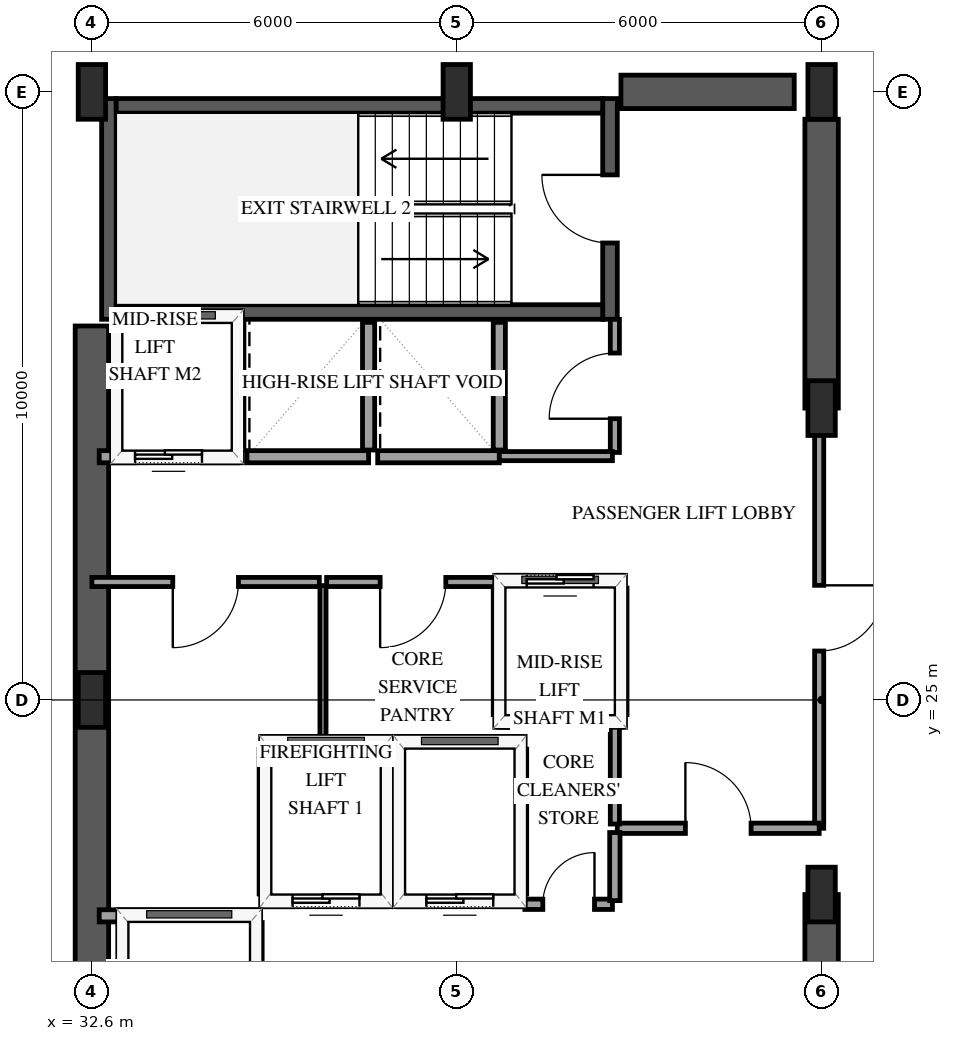
"""IFC4 building model, lengths in metres.
Left out: names, types, materials, properties, quantities, classifications, styles, units other than length and angle.
Written with IfcOpenShell. Run it as: python <this file> out.ifc"""

import sys

from ifc_helpers import new_model, si_unit, direction, frame, frame_2d, origin, origin_2d, place, context, subcontext, project, spatial, rectangle, extrude, element, fill, save


model = new_model("IFC4")
c1 = context("Model", 3, precision=1e-05, world=origin(), true_north=direction((0.0, 1.0)))
c2 = subcontext(c1, "Body", "Model", "MODEL_VIEW")
j1 = project(units=[si_unit("LENGTHUNIT", "METRE"), si_unit("PLANEANGLEUNIT", "RADIAN")], contexts=[c1])
p1 = place(None, origin())
s1 = spatial("IfcSite", under=j1, at=p1, CompositionType="ELEMENT")
p2 = place(p1, origin())
s2 = spatial("IfcBuilding", under=s1, at=p2, CompositionType="ELEMENT")
p3 = place(p2, frame((0.0, 0.0, 153.4)))
s3 = spatial("IfcBuildingStorey", under=s2, at=p3, CompositionType="ELEMENT", Elevation=153.4)
p4 = place(p3, frame((32.88, 31.26, 0.0), z_axis=(0.0, 0.0, 1.0), x_axis=(0.0, 1.0, 0.0)))
e1 = element("IfcWall", 1, at=p4, inside=s3, PredefinedType="SHEAR", context=c2, shape_type="SweptSolid", body=[
    extrude(rectangle(XDim=3.63, YDim=0.24, at=frame_2d((1.815, 0.0))), origin(), (0.0, 0.0, 1.0), 3.6),
])
p5 = place(p3, frame((41.12, 31.26, 0.0), z_axis=(0.0, 0.0, 1.0), x_axis=(0.0, 1.0, 0.0)))
e2 = element("IfcWall", 2, at=p5, inside=s3, PredefinedType="SHEAR", context=c2, shape_type="SweptSolid", body=[
    extrude(rectangle(XDim=3.63, YDim=0.24, at=frame_2d((1.815, 0.0))), origin(), (0.0, 0.0, 1.0), 3.6),
])
p6 = place(p5, frame((1.255, 0.0, 0.0)))
e3 = element("IfcOpeningElement", 3, at=p6, cuts=e2, PredefinedType="OPENING", context=c2, shape_type="SweptSolid", body=[
    extrude(rectangle(XDim=1.12, YDim=2.15, at=frame_2d((0.56, 1.075))), frame((0.0, 0.13, 0.0), z_axis=(0.0, -1.0, 0.0), x_axis=(1.0, 0.0, 0.0)), (0.0, 0.0, 1.0), 0.26),
])
for number, where, z_axis, x_axis in (
    (4, (33.0, 31.38, 0.0), (0.0, 0.0, 1.0), (1.0, 0.0, 0.0)),
    (5, (33.0, 34.77, 0.0), (0.0, 0.0, 1.0), (1.0, 0.0, 0.0)),
):
    element("IfcWall", number, at=place(p3, frame(where, z_axis=z_axis, x_axis=x_axis)), inside=s3, PredefinedType="SHEAR", context=c2, shape_type="SweptSolid", body=[
        extrude(rectangle(XDim=8.0, YDim=0.24, at=frame_2d((4.0, 0.0))), origin(), (0.0, 0.0, 1.0), 3.6),
    ])
p7 = place(p3, frame((32.6, 18.85, 0.0), z_axis=(0.0, 0.0, 1.0), x_axis=(0.0, 1.0, 0.0)))
e6 = element("IfcWall", 6, at=p7, inside=s3, PredefinedType="SHEAR", context=c2, shape_type="SweptSolid", body=[
    extrude(rectangle(XDim=12.3, YDim=0.55, at=frame_2d((6.15, 0.0))), origin(), (0.0, 0.0, 1.0), 3.6),
])
p8 = place(p3, frame((41.3, 35.0, 0.0), z_axis=(0.0, 0.0, 1.0), x_axis=(1.0, 0.0, 0.0)))
e7 = element("IfcWall", 7, at=p8, inside=s3, PredefinedType="SHEAR", context=c2, shape_type="SweptSolid", body=[
    extrude(rectangle(XDim=2.85, YDim=0.55, at=frame_2d((1.425, 0.0))), origin(), (0.0, 0.0, 1.0), 3.6),
])
p9 = place(p3, frame((44.6, 15.45, 0.0), z_axis=(0.0, 0.0, 1.0), x_axis=(0.0, 1.0, 0.0)))
e8 = element("IfcWall", 8, at=p9, inside=s3, PredefinedType="SHEAR", context=c2, shape_type="SweptSolid", body=[
    extrude(rectangle(XDim=6.35, YDim=0.55, at=frame_2d((3.175, 0.0))), origin(), (0.0, 0.0, 1.0), 3.6),
])
p10 = place(p3, frame((44.6, 29.8, 0.0), z_axis=(0.0, 0.0, 1.0), x_axis=(0.0, 1.0, 0.0)))
e9 = element("IfcWall", 9, at=p10, inside=s3, PredefinedType="SHEAR", context=c2, shape_type="SweptSolid", body=[
    extrude(rectangle(XDim=4.75, YDim=0.55, at=frame_2d((2.375, 0.0))), origin(), (0.0, 0.0, 1.0), 3.6),
])
for number, where, z_axis, x_axis in (
    (10, (32.6, 25.0, 0.0), (0.0, 0.0, 1.0), (1.0, 0.0, 0.0)),
    (11, (32.6, 35.0, 0.0), (0.0, 0.0, 1.0), (1.0, 0.0, 0.0)),
    (12, (38.6, 35.0, 0.0), (0.0, 0.0, 1.0), (1.0, 0.0, 0.0)),
    (13, (44.6, 21.8, 0.0), (0.0, 0.0, 1.0), (1.0, 0.0, 0.0)),
    (14, (44.6, 29.8, 0.0), (0.0, 0.0, 1.0), (1.0, 0.0, 0.0)),
    (15, (44.6, 35.0, 0.0), (0.0, 0.0, 1.0), (1.0, 0.0, 0.0)),
):
    element("IfcColumn", number, at=place(p3, frame(where, z_axis=z_axis, x_axis=x_axis)), inside=s3, PredefinedType="PILASTER", context=c2, shape_type="SweptSolid", body=[
        extrude(rectangle(XDim=0.45, YDim=0.9, at=origin_2d()), origin(), (0.0, 0.0, 1.0), 3.6),
    ])
p11 = place(p3, frame((32.04, 37.894, 0.0), z_axis=(0.0, 0.0, 1.0), x_axis=(-0.645495712839, -0.763763893299, 0.0)))
e16 = element("IfcWall", 16, at=p11, inside=s3, PredefinedType="SOLIDWALL", context=c2, shape_type="SweptSolid", body=[
    extrude(rectangle(XDim=2.966, YDim=0.27, at=frame_2d((1.483, 0.0))), origin(), (0.0, 0.0, 1.0), 2.679),
])
p12 = place(p3, frame((35.45, 21.7, 0.0), z_axis=(0.0, 0.0, 1.0), x_axis=(1.0, 0.0, 0.0)))
e17 = element("IfcWall", 17, at=p12, inside=s3, PredefinedType="SOLIDWALL", context=c2, shape_type="SweptSolid", body=[
    extrude(rectangle(XDim=2.0, YDim=0.2, at=frame_2d((1.0, 0.0))), origin(), (0.0, 0.0, 1.0), 3.3),
])
p13 = place(p12, frame((0.45, 0.0, 0.0)))
e18 = element("IfcOpeningElement", 18, at=p13, cuts=e17, PredefinedType="OPENING", context=c2, shape_type="SweptSolid", body=[
    extrude(rectangle(XDim=1.1, YDim=2.15, at=frame_2d((0.55, 1.075))), frame((0.0, 0.11, 0.0), z_axis=(0.0, -1.0, 0.0), x_axis=(1.0, 0.0, 0.0)), (0.0, 0.0, 1.0), 0.22),
])
p14 = place(p3, frame((35.45, 24.3, 0.0), z_axis=(0.0, 0.0, 1.0), x_axis=(1.0, 0.0, 0.0)))
e19 = element("IfcWall", 19, at=p14, inside=s3, PredefinedType="SOLIDWALL", context=c2, shape_type="SweptSolid", body=[
    extrude(rectangle(XDim=2.0, YDim=0.2, at=frame_2d((1.0, 0.0))), origin(), (0.0, 0.0, 1.0), 3.3),
])
for number, where, z_axis, x_axis in (
    (20, (35.45, 21.81, 0.0), (0.0, 0.0, 1.0), (0.0, 1.0, 0.0)),
    (21, (37.45, 21.81, 0.0), (0.0, 0.0, 1.0), (0.0, 1.0, 0.0)),
):
    element("IfcWall", number, at=place(p3, frame(where, z_axis=z_axis, x_axis=x_axis)), inside=s3, PredefinedType="SOLIDWALL", context=c2, shape_type="SweptSolid", body=[
        extrude(rectangle(XDim=2.38, YDim=0.2, at=frame_2d((1.19, 0.0))), origin(), (0.0, 0.0, 1.0), 3.3),
    ])
p15 = place(p3, frame((37.65, 21.7, 0.0), z_axis=(0.0, 0.0, 1.0), x_axis=(1.0, 0.0, 0.0)))
e22 = element("IfcWall", 22, at=p15, inside=s3, PredefinedType="SOLIDWALL", context=c2, shape_type="SweptSolid", body=[
    extrude(rectangle(XDim=2.0, YDim=0.2, at=frame_2d((1.0, 0.0))), origin(), (0.0, 0.0, 1.0), 3.3),
])
p16 = place(p15, frame((0.45, 0.0, 0.0)))
e23 = element("IfcOpeningElement", 23, at=p16, cuts=e22, PredefinedType="OPENING", context=c2, shape_type="SweptSolid", body=[
    extrude(rectangle(XDim=1.1, YDim=2.15, at=frame_2d((0.55, 1.075))), frame((0.0, 0.11, 0.0), z_axis=(0.0, -1.0, 0.0), x_axis=(1.0, 0.0, 0.0)), (0.0, 0.0, 1.0), 0.22),
])
p17 = place(p3, frame((37.65, 24.3, 0.0), z_axis=(0.0, 0.0, 1.0), x_axis=(1.0, 0.0, 0.0)))
e24 = element("IfcWall", 24, at=p17, inside=s3, PredefinedType="SOLIDWALL", context=c2, shape_type="SweptSolid", body=[
    extrude(rectangle(XDim=2.0, YDim=0.2, at=frame_2d((1.0, 0.0))), origin(), (0.0, 0.0, 1.0), 3.3),
])
p18 = place(p3, frame((39.65, 21.81, 0.0), z_axis=(0.0, 0.0, 1.0), x_axis=(0.0, 1.0, 0.0)))
e25 = element("IfcWall", 25, at=p18, inside=s3, PredefinedType="SOLIDWALL", context=c2, shape_type="SweptSolid", body=[
    extrude(rectangle(XDim=2.38, YDim=0.2, at=frame_2d((1.19, 0.0))), origin(), (0.0, 0.0, 1.0), 3.3),
])
p19 = place(p3, frame((32.72, 21.45, 0.0), z_axis=(0.0, 0.0, 1.0), x_axis=(1.0, 0.0, 0.0)))
e26 = element("IfcWall", 26, at=p19, inside=s3, PredefinedType="SOLIDWALL", context=c2, shape_type="SweptSolid", body=[
    extrude(rectangle(XDim=2.58, YDim=0.2, at=frame_2d((1.29, 0.0))), origin(), (0.0, 0.0, 1.0), 3.3),
])
p20 = place(p3, frame((35.3, 18.79, 0.0), z_axis=(0.0, 0.0, 1.0), x_axis=(0.0, 1.0, 0.0)))
e27 = element("IfcWall", 27, at=p20, inside=s3, PredefinedType="SOLIDWALL", context=c2, shape_type="SweptSolid", body=[
    extrude(rectangle(XDim=2.55, YDim=0.2, at=frame_2d((1.275, 0.0))), origin(), (0.0, 0.0, 1.0), 3.3),
])
p21 = place(p20, frame((0.725, 0.0, 0.0)))
e28 = element("IfcOpeningElement", 28, at=p21, cuts=e27, PredefinedType="OPENING", context=c2, shape_type="SweptSolid", body=[
    extrude(rectangle(XDim=1.1, YDim=2.15, at=frame_2d((0.55, 1.075))), frame((0.0, 0.11, 0.0), z_axis=(0.0, -1.0, 0.0), x_axis=(1.0, 0.0, 0.0)), (0.0, 0.0, 1.0), 0.22),
])
p22 = place(p3, frame((39.3, 24.65, 0.0), z_axis=(0.0, 0.0, 1.0), x_axis=(1.0, 0.0, 0.0)))
e29 = element("IfcWall", 29, at=p22, inside=s3, PredefinedType="SOLIDWALL", context=c2, shape_type="SweptSolid", body=[
    extrude(rectangle(XDim=2.0, YDim=0.2, at=frame_2d((1.0, 0.0))), origin(), (0.0, 0.0, 1.0), 3.3),
])
p23 = place(p3, frame((39.3, 26.95, 0.0), z_axis=(0.0, 0.0, 1.0), x_axis=(1.0, 0.0, 0.0)))
e30 = element("IfcWall", 30, at=p23, inside=s3, PredefinedType="SOLIDWALL", context=c2, shape_type="SweptSolid", body=[
    extrude(rectangle(XDim=2.0, YDim=0.2, at=frame_2d((1.0, 0.0))), origin(), (0.0, 0.0, 1.0), 3.3),
])
p24 = place(p23, frame((0.45, 0.0, 0.0)))
e31 = element("IfcOpeningElement", 31, at=p24, cuts=e30, PredefinedType="OPENING", context=c2, shape_type="SweptSolid", body=[
    extrude(rectangle(XDim=1.1, YDim=2.15, at=frame_2d((0.55, 1.075))), frame((0.0, 0.11, 0.0), z_axis=(0.0, -1.0, 0.0), x_axis=(1.0, 0.0, 0.0)), (0.0, 0.0, 1.0), 0.22),
])
for number, where, z_axis, x_axis in (
    (32, (39.3, 24.76, 0.0), (0.0, 0.0, 1.0), (0.0, 1.0, 0.0)),
    (33, (41.3, 24.76, 0.0), (0.0, 0.0, 1.0), (0.0, 1.0, 0.0)),
):
    element("IfcWall", number, at=place(p3, frame(where, z_axis=z_axis, x_axis=x_axis)), inside=s3, PredefinedType="SOLIDWALL", context=c2, shape_type="SweptSolid", body=[
        extrude(rectangle(XDim=2.08, YDim=0.2, at=frame_2d((1.04, 0.0))), origin(), (0.0, 0.0, 1.0), 3.3),
    ])
p25 = place(p3, frame((32.72, 29.0, 0.0), z_axis=(0.0, 0.0, 1.0), x_axis=(1.0, 0.0, 0.0)))
e34 = element("IfcWall", 34, at=p25, inside=s3, PredefinedType="SOLIDWALL", context=c2, shape_type="SweptSolid", body=[
    extrude(rectangle(XDim=2.28, YDim=0.2, at=frame_2d((1.14, 0.0))), origin(), (0.0, 0.0, 1.0), 3.3),
])
p26 = place(p25, frame((0.59, 0.0, 0.0)))
e35 = element("IfcOpeningElement", 35, at=p26, cuts=e34, PredefinedType="OPENING", context=c2, shape_type="SweptSolid", body=[
    extrude(rectangle(XDim=1.1, YDim=2.15, at=frame_2d((0.55, 1.075))), frame((0.0, 0.11, 0.0), z_axis=(0.0, -1.0, 0.0), x_axis=(1.0, 0.0, 0.0)), (0.0, 0.0, 1.0), 0.22),
])
p27 = place(p3, frame((35.0, 29.11, 0.0), z_axis=(0.0, 0.0, 1.0), x_axis=(0.0, 1.0, 0.0)))
e36 = element("IfcWall", 36, at=p27, inside=s3, PredefinedType="SOLIDWALL", context=c2, shape_type="SweptSolid", body=[
    extrude(rectangle(XDim=2.1, YDim=0.2, at=frame_2d((1.05, 0.0))), origin(), (0.0, 0.0, 1.0), 3.3),
])
p28 = place(p3, frame((35.15, 29.0, 0.0), z_axis=(0.0, 0.0, 1.0), x_axis=(1.0, 0.0, 0.0)))
e37 = element("IfcWall", 37, at=p28, inside=s3, PredefinedType="SOLIDWALL", context=c2, shape_type="SweptSolid", body=[
    extrude(rectangle(XDim=2.0, YDim=0.2, at=frame_2d((1.0, 0.0))), origin(), (0.0, 0.0, 1.0), 3.3),
])
p29 = place(p3, frame((37.15, 29.11, 0.0), z_axis=(0.0, 0.0, 1.0), x_axis=(0.0, 1.0, 0.0)))
e38 = element("IfcWall", 38, at=p29, inside=s3, PredefinedType="SOLIDWALL", context=c2, shape_type="SweptSolid", body=[
    extrude(rectangle(XDim=2.1, YDim=0.2, at=frame_2d((1.05, 0.0))), origin(), (0.0, 0.0, 1.0), 3.3),
])
p30 = place(p3, frame((37.3, 29.0, 0.0), z_axis=(0.0, 0.0, 1.0), x_axis=(1.0, 0.0, 0.0)))
e39 = element("IfcWall", 39, at=p30, inside=s3, PredefinedType="SOLIDWALL", context=c2, shape_type="SweptSolid", body=[
    extrude(rectangle(XDim=2.0, YDim=0.2, at=frame_2d((1.0, 0.0))), origin(), (0.0, 0.0, 1.0), 3.3),
])
p31 = place(p3, frame((39.3, 29.11, 0.0), z_axis=(0.0, 0.0, 1.0), x_axis=(0.0, 1.0, 0.0)))
e40 = element("IfcWall", 40, at=p31, inside=s3, PredefinedType="SOLIDWALL", context=c2, shape_type="SweptSolid", body=[
    extrude(rectangle(XDim=2.1, YDim=0.2, at=frame_2d((1.05, 0.0))), origin(), (0.0, 0.0, 1.0), 3.3),
])
p32 = place(p3, frame((44.56, 29.8, 0.0), z_axis=(0.0, 0.0, 1.0), x_axis=(0.0, -1.0, 0.0)))
e41 = element("IfcWall", 41, at=p32, inside=s3, PredefinedType="PARTITIONING", context=c2, shape_type="SweptSolid", body=[
    extrude(rectangle(XDim=6.91, YDim=0.15, at=frame_2d((3.455, 0.0))), origin(), (0.0, 0.0, 1.0), 2.34),
])
p33 = place(p32, frame((2.915, 0.0, 0.0)))
e42 = element("IfcOpeningElement", 42, at=p33, cuts=e41, PredefinedType="OPENING", context=c2, shape_type="SweptSolid", body=[
    extrude(rectangle(XDim=1.08, YDim=2.15, at=frame_2d((0.54, 1.075))), frame((0.0, 0.085, 0.0), z_axis=(0.0, -1.0, 0.0), x_axis=(1.0, 0.0, 0.0)), (0.0, 0.0, 1.0), 0.17),
])
p34 = place(p3, frame((36.34, 26.94, 0.0), z_axis=(0.0, 0.0, 1.0), x_axis=(-1.0, 0.0, 0.0)))
e43 = element("IfcWall", 43, at=p34, inside=s3, PredefinedType="PARTITIONING", context=c2, shape_type="SweptSolid", body=[
    extrude(rectangle(XDim=3.74, YDim=0.15, at=frame_2d((1.87, 0.0))), origin(), (0.0, 0.0, 1.0), 3.3),
])
p35 = place(p34, frame((1.33, 0.0, 0.0)))
e44 = element("IfcOpeningElement", 44, at=p35, cuts=e43, PredefinedType="OPENING", context=c2, shape_type="SweptSolid", body=[
    extrude(rectangle(XDim=1.08, YDim=2.15, at=frame_2d((0.54, 1.075))), frame((0.0, 0.085, 0.0), z_axis=(0.0, -1.0, 0.0), x_axis=(1.0, 0.0, 0.0)), (0.0, 0.0, 1.0), 0.17),
])
p36 = place(p3, frame((41.24, 22.89, 0.0), z_axis=(0.0, 0.0, 1.0), x_axis=(1.0, 0.0, 0.0)))
e45 = element("IfcWall", 45, at=p36, inside=s3, PredefinedType="PARTITIONING", context=c2, shape_type="SweptSolid", body=[
    extrude(rectangle(XDim=3.32, YDim=0.17, at=frame_2d((1.66, 0.0))), origin(), (0.0, 0.0, 1.0), 3.3),
])
p37 = place(p36, frame((1.12, 0.0, 0.0)))
e46 = element("IfcOpeningElement", 46, at=p37, cuts=e45, PredefinedType="OPENING", context=c2, shape_type="SweptSolid", body=[
    extrude(rectangle(XDim=1.08, YDim=2.15, at=frame_2d((0.54, 1.075))), frame((0.0, 0.095, 0.0), z_axis=(0.0, -1.0, 0.0), x_axis=(1.0, 0.0, 0.0)), (0.0, 0.0, 1.0), 0.19),
])
p38 = place(p3, frame((39.3, 26.94, 0.0), z_axis=(0.0, 0.0, 1.0), x_axis=(-1.0, 0.0, 0.0)))
e47 = element("IfcWall", 47, at=p38, inside=s3, PredefinedType="PARTITIONING", context=c2, shape_type="SweptSolid", body=[
    extrude(rectangle(XDim=2.84, YDim=0.15, at=frame_2d((1.42, 0.0))), origin(), (0.0, 0.0, 1.0), 3.3),
])
p39 = place(p38, frame((0.88, 0.0, 0.0)))
e48 = element("IfcOpeningElement", 48, at=p39, cuts=e47, PredefinedType="OPENING", context=c2, shape_type="SweptSolid", body=[
    extrude(rectangle(XDim=1.08, YDim=2.15, at=frame_2d((0.54, 1.075))), frame((0.0, 0.085, 0.0), z_axis=(0.0, -1.0, 0.0), x_axis=(1.0, 0.0, 0.0)), (0.0, 0.0, 1.0), 0.17),
])
p40 = place(p3, frame((36.4, 26.88, 0.0), z_axis=(0.0, 0.0, 1.0), x_axis=(0.0, -1.0, 0.0)))
e49 = element("IfcWall", 49, at=p40, inside=s3, PredefinedType="PARTITIONING", context=c2, shape_type="SweptSolid", body=[
    extrude(rectangle(XDim=2.58, YDim=0.1, at=frame_2d((1.29, 0.0))), origin(), (0.0, 0.0, 1.0), 3.3),
])
p41 = place(p3, frame((41.2, 29.07, 0.0), z_axis=(0.0, 0.0, 1.0), x_axis=(0.0, 1.0, 0.0)))
e50 = element("IfcWall", 50, at=p41, inside=s3, PredefinedType="PARTITIONING", context=c2, shape_type="SweptSolid", body=[
    extrude(rectangle(XDim=2.19, YDim=0.15, at=frame_2d((1.095, 0.0))), origin(), (0.0, 0.0, 1.0), 3.3),
])
p42 = place(p41, frame((0.555, 0.0, 0.0)))
e51 = element("IfcOpeningElement", 51, at=p42, cuts=e50, PredefinedType="OPENING", context=c2, shape_type="SweptSolid", body=[
    extrude(rectangle(XDim=1.08, YDim=2.15, at=frame_2d((0.54, 1.075))), frame((0.0, 0.085, 0.0), z_axis=(0.0, -1.0, 0.0), x_axis=(1.0, 0.0, 0.0)), (0.0, 0.0, 1.0), 0.17),
])
p43 = place(p3, frame((39.3, 29.01, 0.0), z_axis=(0.0, 0.0, 1.0), x_axis=(1.0, 0.0, 0.0)))
e52 = element("IfcWall", 52, at=p43, inside=s3, PredefinedType="PARTITIONING", context=c2, shape_type="SweptSolid", body=[
    extrude(rectangle(XDim=1.86, YDim=0.15, at=frame_2d((0.93, 0.0))), origin(), (0.0, 0.0, 1.0), 3.3),
])
p44 = place(p3, frame((41.2, 22.96, 0.0), z_axis=(0.0, 0.0, 1.0), x_axis=(0.0, 1.0, 0.0)))
e53 = element("IfcWall", 53, at=p44, inside=s3, PredefinedType="PARTITIONING", context=c2, shape_type="SweptSolid", body=[
    extrude(rectangle(XDim=1.69, YDim=0.15, at=frame_2d((0.845, 0.0))), origin(), (0.0, 0.0, 1.0), 3.3),
])
p45 = place(p3, frame((39.72, 21.64, 0.0), z_axis=(0.0, 0.0, 1.0), x_axis=(1.0, 0.0, 0.0)))
e54 = element("IfcWall", 54, at=p45, inside=s3, PredefinedType="PARTITIONING", context=c2, shape_type="SweptSolid", body=[
    extrude(rectangle(XDim=1.44, YDim=0.17, at=frame_2d((0.72, 0.0))), origin(), (0.0, 0.0, 1.0), 3.3),
])
p46 = place(p45, frame((0.295, 0.0, 0.0)))
e55 = element("IfcOpeningElement", 55, at=p46, cuts=e54, PredefinedType="OPENING", context=c2, shape_type="SweptSolid", body=[
    extrude(rectangle(XDim=0.85, YDim=2.1, at=frame_2d((0.425, 1.05))), frame((0.0, 0.095, 0.0), z_axis=(0.0, -1.0, 0.0), x_axis=(1.0, 0.0, 0.0)), (0.0, 0.0, 1.0), 0.19),
])
p47 = place(p3, frame((41.2, 21.7, 0.0), z_axis=(0.0, 0.0, 1.0), x_axis=(0.0, 1.0, 0.0)))
e56 = element("IfcWall", 56, at=p47, inside=s3, PredefinedType="PARTITIONING", context=c2, shape_type="SweptSolid", body=[
    extrude(rectangle(XDim=1.12, YDim=0.17, at=frame_2d((0.56, 0.0))), origin(), (0.0, 0.0, 1.0), 3.3),
])
p48 = place(p13, origin())
e57 = element("IfcDoor", 57, at=p48, inside=s3, OperationType="SLIDING_TO_LEFT", PredefinedType="DOOR", context=c2, shape_type="SweptSolid", body=[
    extrude(rectangle(XDim=1.1, YDim=2.15, at=frame_2d((0.55, 1.075))), frame((0.0, 0.025, 0.0), z_axis=(0.0, -1.0, 0.0), x_axis=(1.0, 0.0, 0.0)), (0.0, 0.0, 1.0), 0.05),
])
fill(e18, e57)
p49 = place(p16, origin())
e58 = element("IfcDoor", 58, at=p49, inside=s3, OperationType="SLIDING_TO_LEFT", PredefinedType="DOOR", context=c2, shape_type="SweptSolid", body=[
    extrude(rectangle(XDim=1.1, YDim=2.15, at=frame_2d((0.55, 1.075))), frame((0.0, 0.025, 0.0), z_axis=(0.0, -1.0, 0.0), x_axis=(1.0, 0.0, 0.0)), (0.0, 0.0, 1.0), 0.05),
])
fill(e23, e58)
p50 = place(p24, origin())
e59 = element("IfcDoor", 59, at=p50, inside=s3, OperationType="SLIDING_TO_LEFT", PredefinedType="DOOR", context=c2, shape_type="SweptSolid", body=[
    extrude(rectangle(XDim=1.1, YDim=2.15, at=frame_2d((0.55, 1.075))), frame((0.0, 0.025, 0.0), z_axis=(0.0, -1.0, 0.0), x_axis=(1.0, 0.0, 0.0)), (0.0, 0.0, 1.0), 0.05),
])
fill(e31, e59)
p51 = place(p26, origin())
e60 = element("IfcDoor", 60, at=p51, inside=s3, OperationType="SLIDING_TO_LEFT", PredefinedType="DOOR", context=c2, shape_type="SweptSolid", body=[
    extrude(rectangle(XDim=1.1, YDim=2.15, at=frame_2d((0.55, 1.075))), frame((0.0, 0.025, 0.0), z_axis=(0.0, -1.0, 0.0), x_axis=(1.0, 0.0, 0.0)), (0.0, 0.0, 1.0), 0.05),
])
fill(e35, e60)
p52 = place(p6, origin())
e61 = element("IfcDoor", 61, at=p52, inside=s3, OperationType="SINGLE_SWING_RIGHT", PredefinedType="DOOR", context=c2, shape_type="SweptSolid", body=[
    extrude(rectangle(XDim=1.12, YDim=2.15, at=frame_2d((0.56, 1.075))), frame((0.0, 0.025, 0.0), z_axis=(0.0, -1.0, 0.0), x_axis=(1.0, 0.0, 0.0)), (0.0, 0.0, 1.0), 0.05),
])
fill(e3, e61)
p53 = place(p33, origin())
e62 = element("IfcDoor", 62, at=p53, inside=s3, OperationType="SINGLE_SWING_LEFT", PredefinedType="DOOR", context=c2, shape_type="SweptSolid", body=[
    extrude(rectangle(XDim=1.08, YDim=2.15, at=frame_2d((0.54, 1.075))), frame((0.0, 0.025, 0.0), z_axis=(0.0, -1.0, 0.0), x_axis=(1.0, 0.0, 0.0)), (0.0, 0.0, 1.0), 0.05),
])
fill(e42, e62)
p54 = place(p35, origin())
e63 = element("IfcDoor", 63, at=p54, inside=s3, OperationType="SINGLE_SWING_RIGHT", PredefinedType="DOOR", context=c2, shape_type="SweptSolid", body=[
    extrude(rectangle(XDim=1.08, YDim=2.15, at=frame_2d((0.54, 1.075))), frame((0.0, 0.025, 0.0), z_axis=(0.0, -1.0, 0.0), x_axis=(1.0, 0.0, 0.0)), (0.0, 0.0, 1.0), 0.05),
])
fill(e44, e63)
p55 = place(p37, origin())
e64 = element("IfcDoor", 64, at=p55, inside=s3, OperationType="SINGLE_SWING_LEFT", PredefinedType="DOOR", context=c2, shape_type="SweptSolid", body=[
    extrude(rectangle(XDim=1.08, YDim=2.15, at=frame_2d((0.54, 1.075))), frame((0.0, 0.025, 0.0), z_axis=(0.0, -1.0, 0.0), x_axis=(1.0, 0.0, 0.0)), (0.0, 0.0, 1.0), 0.05),
])
fill(e46, e64)
p56 = place(p39, origin())
e65 = element("IfcDoor", 65, at=p56, inside=s3, OperationType="SINGLE_SWING_RIGHT", PredefinedType="DOOR", context=c2, shape_type="SweptSolid", body=[
    extrude(rectangle(XDim=1.08, YDim=2.15, at=frame_2d((0.54, 1.075))), frame((0.0, 0.025, 0.0), z_axis=(0.0, -1.0, 0.0), x_axis=(1.0, 0.0, 0.0)), (0.0, 0.0, 1.0), 0.05),
])
fill(e48, e65)
p57 = place(p42, origin())
e66 = element("IfcDoor", 66, at=p57, inside=s3, OperationType="SINGLE_SWING_LEFT", PredefinedType="DOOR", context=c2, shape_type="SweptSolid", body=[
    extrude(rectangle(XDim=1.08, YDim=2.15, at=frame_2d((0.54, 1.075))), frame((0.0, 0.025, 0.0), z_axis=(0.0, -1.0, 0.0), x_axis=(1.0, 0.0, 0.0)), (0.0, 0.0, 1.0), 0.05),
])
fill(e51, e66)
p58 = place(p46, origin())
e67 = element("IfcDoor", 67, at=p58, inside=s3, OperationType="SINGLE_SWING_RIGHT", PredefinedType="DOOR", context=c2, shape_type="SweptSolid", body=[
    extrude(rectangle(XDim=0.85, YDim=2.1, at=frame_2d((0.425, 1.05))), frame((0.0, 0.025, 0.0), z_axis=(0.0, -1.0, 0.0), x_axis=(1.0, 0.0, 0.0)), (0.0, 0.0, 1.0), 0.05),
])
fill(e55, e67)
save(model, sys.argv[1])
